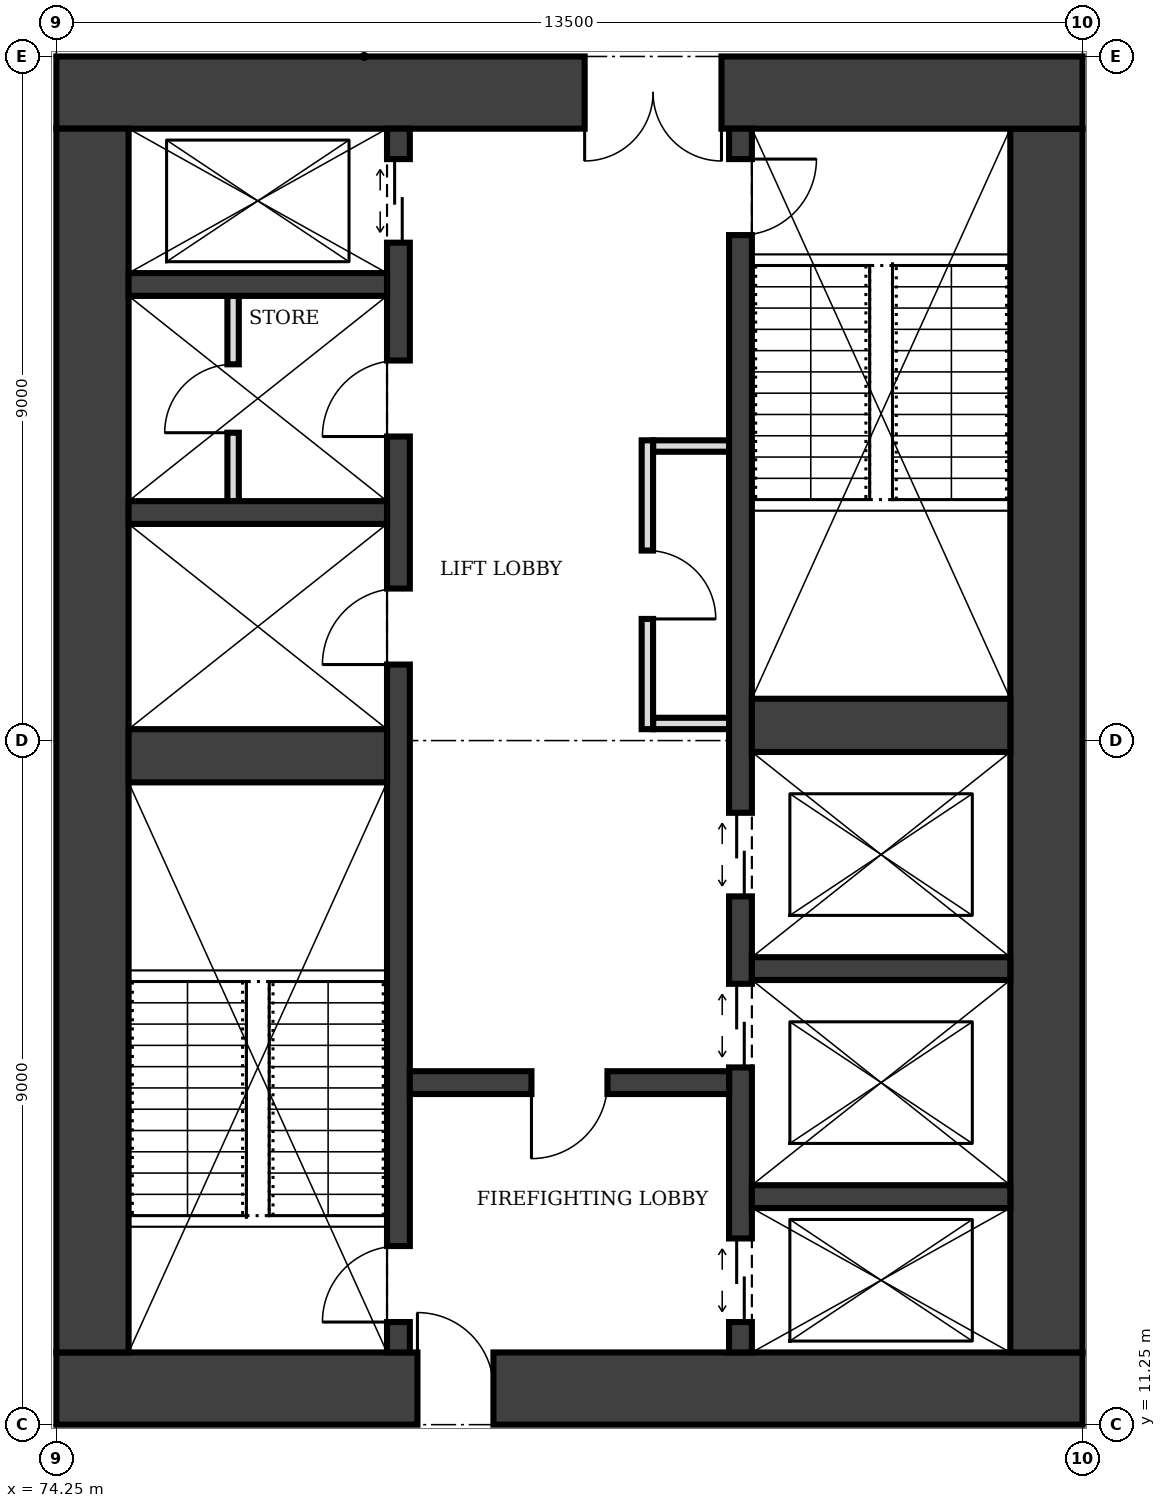
"""IFC4 building model, lengths in metres.
Left out: names, types, materials, properties, quantities, classifications, styles, units other than length and angle.
Written with IfcOpenShell. Run it as: python <this file> out.ifc"""

import sys

from ifc_helpers import new_model, si_unit, direction, frame, frame_2d, origin, place, context, subcontext, project, spatial, rectangle, extrude, element, fill, save


model = new_model("IFC4")
c1 = context("Model", 3, precision=1e-05, world=origin(), true_north=direction((0.0, 1.0)))
c2 = subcontext(c1, "Body", "Model", "MODEL_VIEW")
j1 = project(units=[si_unit("LENGTHUNIT", "METRE"), si_unit("PLANEANGLEUNIT", "RADIAN")], contexts=[c1])
p1 = place(None, origin())
s1 = spatial("IfcSite", under=j1, at=p1, CompositionType="ELEMENT")
p2 = place(p1, origin())
s2 = spatial("IfcBuilding", under=s1, at=p2, CompositionType="ELEMENT")
p3 = place(p2, frame((0.0, 0.0, 209.0)))
s3 = spatial("IfcBuildingStorey", under=s2, at=p3, CompositionType="ELEMENT", Elevation=209.0)
p4 = place(p3, frame((74.25, 11.725, 0.0), z_axis=(0.0, 0.0, 1.0), x_axis=(1.0, 0.0, 0.0)))
e1 = element("IfcWall", 1, at=p4, inside=s3, PredefinedType="SHEAR", context=c2, shape_type="SweptSolid", body=[
    extrude(rectangle(XDim=13.5, YDim=0.95, at=frame_2d((6.75, 0.0))), origin(), (0.0, 0.0, 1.0), 4.0),
])
p5 = place(p4, frame((4.75, 0.0, 0.0)))
e2 = element("IfcOpeningElement", 2, at=p5, cuts=e1, PredefinedType="OPENING", context=c2, shape_type="SweptSolid", body=[
    extrude(rectangle(XDim=1.0, YDim=2.1, at=frame_2d((0.5, 1.05))), frame((0.0, 0.485, 0.0), z_axis=(0.0, -1.0, 0.0), x_axis=(1.0, 0.0, 0.0)), (0.0, 0.0, 1.0), 0.97),
])
p6 = place(p3, frame((87.275, 12.2, 0.0), z_axis=(0.0, 0.0, 1.0), x_axis=(0.0, 1.0, 0.0)))
e3 = element("IfcWall", 3, at=p6, inside=s3, PredefinedType="SHEAR", context=c2, shape_type="SweptSolid", body=[
    extrude(rectangle(XDim=16.1, YDim=0.95, at=frame_2d((8.05, 0.0))), origin(), (0.0, 0.0, 1.0), 4.0),
])
p7 = place(p3, frame((87.75, 28.775, 0.0), z_axis=(0.0, 0.0, 1.0), x_axis=(-1.0, 0.0, 0.0)))
e4 = element("IfcWall", 4, at=p7, inside=s3, PredefinedType="SHEAR", context=c2, shape_type="SweptSolid", body=[
    extrude(rectangle(XDim=13.5, YDim=0.95, at=frame_2d((6.75, 0.0))), origin(), (0.0, 0.0, 1.0), 4.0),
])
p8 = place(p7, frame((4.75, 0.0, 0.0)))
e5 = element("IfcOpeningElement", 5, at=p8, cuts=e4, PredefinedType="OPENING", context=c2, shape_type="SweptSolid", body=[
    extrude(rectangle(XDim=1.8, YDim=2.1, at=frame_2d((0.9, 1.05))), frame((0.0, 0.485, 0.0), z_axis=(0.0, -1.0, 0.0), x_axis=(1.0, 0.0, 0.0)), (0.0, 0.0, 1.0), 0.97),
])
p9 = place(p3, frame((74.725, 28.3, 0.0), z_axis=(0.0, 0.0, 1.0), x_axis=(0.0, -1.0, 0.0)))
e6 = element("IfcWall", 6, at=p9, inside=s3, PredefinedType="SHEAR", context=c2, shape_type="SweptSolid", body=[
    extrude(rectangle(XDim=16.1, YDim=0.95, at=frame_2d((8.05, 0.0))), origin(), (0.0, 0.0, 1.0), 4.0),
])
p10 = place(p3, frame((78.75, 12.2, 0.0), z_axis=(0.0, 0.0, 1.0), x_axis=(0.0, 1.0, 0.0)))
e7 = element("IfcWall", 7, at=p10, inside=s3, PredefinedType="SHEAR", context=c2, shape_type="SweptSolid", body=[
    extrude(rectangle(XDim=16.1, YDim=0.3, at=frame_2d((8.05, 0.0))), origin(), (0.0, 0.0, 1.0), 4.0),
])
p11 = place(p10, frame((0.4, 0.0, 0.0)))
e8 = element("IfcOpeningElement", 8, at=p11, cuts=e7, PredefinedType="OPENING", context=c2, shape_type="SweptSolid", body=[
    extrude(rectangle(XDim=1.0, YDim=2.1, at=frame_2d((0.5, 1.05))), frame((0.0, 0.16, 0.0), z_axis=(0.0, -1.0, 0.0), x_axis=(1.0, 0.0, 0.0)), (0.0, 0.0, 1.0), 0.32),
])
p12 = place(p10, frame((14.6, 0.0, 0.0)))
e9 = element("IfcOpeningElement", 9, at=p12, cuts=e7, PredefinedType="OPENING", context=c2, shape_type="SweptSolid", body=[
    extrude(rectangle(XDim=1.1, YDim=2.1, at=frame_2d((0.55, 1.05))), frame((0.0, 0.16, 0.0), z_axis=(0.0, -1.0, 0.0), x_axis=(1.0, 0.0, 0.0)), (0.0, 0.0, 1.0), 0.32),
])
p13 = place(p10, frame((9.05, 0.0, 0.0)))
e10 = element("IfcOpeningElement", 10, at=p13, cuts=e7, PredefinedType="OPENING", context=c2, shape_type="SweptSolid", body=[
    extrude(rectangle(XDim=1.0, YDim=2.1, at=frame_2d((0.5, 1.05))), frame((0.0, 0.16, 0.0), z_axis=(0.0, -1.0, 0.0), x_axis=(1.0, 0.0, 0.0)), (0.0, 0.0, 1.0), 0.32),
])
p14 = place(p10, frame((12.05, 0.0, 0.0)))
e11 = element("IfcOpeningElement", 11, at=p14, cuts=e7, PredefinedType="OPENING", context=c2, shape_type="SweptSolid", body=[
    extrude(rectangle(XDim=1.0, YDim=2.1, at=frame_2d((0.5, 1.05))), frame((0.0, 0.16, 0.0), z_axis=(0.0, -1.0, 0.0), x_axis=(1.0, 0.0, 0.0)), (0.0, 0.0, 1.0), 0.32),
])
p15 = place(p3, frame((83.25, 12.2, 0.0), z_axis=(0.0, 0.0, 1.0), x_axis=(0.0, 1.0, 0.0)))
e12 = element("IfcWall", 12, at=p15, inside=s3, PredefinedType="SHEAR", context=c2, shape_type="SweptSolid", body=[
    extrude(rectangle(XDim=16.1, YDim=0.3, at=frame_2d((8.05, 0.0))), origin(), (0.0, 0.0, 1.0), 4.0),
])
p16 = place(p15, frame((14.7, 0.0, 0.0)))
e13 = element("IfcOpeningElement", 13, at=p16, cuts=e12, PredefinedType="OPENING", context=c2, shape_type="SweptSolid", body=[
    extrude(rectangle(XDim=1.0, YDim=2.1, at=frame_2d((0.5, 1.05))), frame((0.0, 0.16, 0.0), z_axis=(0.0, -1.0, 0.0), x_axis=(1.0, 0.0, 0.0)), (0.0, 0.0, 1.0), 0.32),
])
p17 = place(p15, frame((0.4, 0.0, 0.0)))
e14 = element("IfcOpeningElement", 14, at=p17, cuts=e12, PredefinedType="OPENING", context=c2, shape_type="SweptSolid", body=[
    extrude(rectangle(XDim=1.1, YDim=2.1, at=frame_2d((0.55, 1.05))), frame((0.0, 0.16, 0.0), z_axis=(0.0, -1.0, 0.0), x_axis=(1.0, 0.0, 0.0)), (0.0, 0.0, 1.0), 0.32),
])
p18 = place(p15, frame((3.75, 0.0, 0.0)))
e15 = element("IfcOpeningElement", 15, at=p18, cuts=e12, PredefinedType="OPENING", context=c2, shape_type="SweptSolid", body=[
    extrude(rectangle(XDim=1.1, YDim=2.1, at=frame_2d((0.55, 1.05))), frame((0.0, 0.16, 0.0), z_axis=(0.0, -1.0, 0.0), x_axis=(1.0, 0.0, 0.0)), (0.0, 0.0, 1.0), 0.32),
])
p19 = place(p15, frame((6.0, 0.0, 0.0)))
e16 = element("IfcOpeningElement", 16, at=p19, cuts=e12, PredefinedType="OPENING", context=c2, shape_type="SweptSolid", body=[
    extrude(rectangle(XDim=1.1, YDim=2.1, at=frame_2d((0.55, 1.05))), frame((0.0, 0.16, 0.0), z_axis=(0.0, -1.0, 0.0), x_axis=(1.0, 0.0, 0.0)), (0.0, 0.0, 1.0), 0.32),
])
p20 = place(p3, frame((75.2, 20.05, 0.0), z_axis=(0.0, 0.0, 1.0), x_axis=(1.0, 0.0, 0.0)))
e17 = element("IfcWall", 17, at=p20, inside=s3, PredefinedType="SHEAR", context=c2, shape_type="SweptSolid", body=[
    extrude(rectangle(XDim=3.4, YDim=0.7, at=frame_2d((1.7, 0.0))), origin(), (0.0, 0.0, 1.0), 4.0),
])
p21 = place(p3, frame((78.9, 15.75, 0.0), z_axis=(0.0, 0.0, 1.0), x_axis=(1.0, 0.0, 0.0)))
e18 = element("IfcWall", 18, at=p21, inside=s3, PredefinedType="SHEAR", context=c2, shape_type="SweptSolid", body=[
    extrude(rectangle(XDim=4.2, YDim=0.3, at=frame_2d((2.1, 0.0))), origin(), (0.0, 0.0, 1.0), 4.0),
])
p22 = place(p21, frame((1.6, 0.0, 0.0)))
e19 = element("IfcOpeningElement", 19, at=p22, cuts=e18, PredefinedType="OPENING", context=c2, shape_type="SweptSolid", body=[
    extrude(rectangle(XDim=1.0, YDim=2.1, at=frame_2d((0.5, 1.05))), frame((0.0, 0.16, 0.0), z_axis=(0.0, -1.0, 0.0), x_axis=(1.0, 0.0, 0.0)), (0.0, 0.0, 1.0), 0.32),
])
for number, where, z_axis, x_axis in (
    (20, (83.4, 14.25, 0.0), (0.0, 0.0, 1.0), (1.0, 0.0, 0.0)),
    (21, (83.4, 17.25, 0.0), (0.0, 0.0, 1.0), (1.0, 0.0, 0.0)),
):
    element("IfcWall", number, at=place(p3, frame(where, z_axis=z_axis, x_axis=x_axis)), inside=s3, PredefinedType="SHEAR", context=c2, shape_type="SweptSolid", body=[
        extrude(rectangle(XDim=3.4, YDim=0.3, at=frame_2d((1.7, 0.0))), origin(), (0.0, 0.0, 1.0), 4.0),
    ])
p23 = place(p3, frame((83.4, 20.45, 0.0), z_axis=(0.0, 0.0, 1.0), x_axis=(1.0, 0.0, 0.0)))
e22 = element("IfcWall", 22, at=p23, inside=s3, PredefinedType="SHEAR", context=c2, shape_type="SweptSolid", body=[
    extrude(rectangle(XDim=3.4, YDim=0.7, at=frame_2d((1.7, 0.0))), origin(), (0.0, 0.0, 1.0), 4.0),
])
for number, where, z_axis, x_axis in (
    (23, (75.2, 23.25, 0.0), (0.0, 0.0, 1.0), (1.0, 0.0, 0.0)),
    (24, (75.2, 26.25, 0.0), (0.0, 0.0, 1.0), (1.0, 0.0, 0.0)),
):
    element("IfcWall", number, at=place(p3, frame(where, z_axis=z_axis, x_axis=x_axis)), inside=s3, PredefinedType="SHEAR", context=c2, shape_type="SweptSolid", body=[
        extrude(rectangle(XDim=3.4, YDim=0.3, at=frame_2d((1.7, 0.0))), origin(), (0.0, 0.0, 1.0), 4.0),
    ])
p24 = place(p3, frame((82.025, 20.4, 0.0), z_axis=(0.0, 0.0, 1.0), x_axis=(0.0, 1.0, 0.0)))
e25 = element("IfcWall", 25, at=p24, inside=s3, PredefinedType="PARTITIONING", context=c2, shape_type="SweptSolid", body=[
    extrude(rectangle(XDim=3.8, YDim=0.15, at=frame_2d((1.9, 0.0))), origin(), (0.0, 0.0, 1.0), 3.75),
])
p25 = place(p24, frame((1.45, 0.0, 0.0)))
e26 = element("IfcOpeningElement", 26, at=p25, cuts=e25, PredefinedType="OPENING", context=c2, shape_type="SweptSolid", body=[
    extrude(rectangle(XDim=0.9, YDim=2.1, at=frame_2d((0.45, 1.05))), frame((0.0, 0.085, 0.0), z_axis=(0.0, -1.0, 0.0), x_axis=(1.0, 0.0, 0.0)), (0.0, 0.0, 1.0), 0.17),
])
for number, where, z_axis, x_axis in (
    (27, (82.1, 20.475, 0.0), (0.0, 0.0, 1.0), (1.0, 0.0, 0.0)),
    (28, (82.1, 24.125, 0.0), (0.0, 0.0, 1.0), (1.0, 0.0, 0.0)),
):
    element("IfcWall", number, at=place(p3, frame(where, z_axis=z_axis, x_axis=x_axis)), inside=s3, PredefinedType="PARTITIONING", context=c2, shape_type="SweptSolid", body=[
        extrude(rectangle(XDim=1.0, YDim=0.15, at=frame_2d((0.5, 0.0))), origin(), (0.0, 0.0, 1.0), 3.75),
    ])
p26 = place(p3, frame((76.575, 23.4, 0.0), z_axis=(0.0, 0.0, 1.0), x_axis=(0.0, 1.0, 0.0)))
e29 = element("IfcWall", 29, at=p26, inside=s3, PredefinedType="PARTITIONING", context=c2, shape_type="SweptSolid", body=[
    extrude(rectangle(XDim=2.7, YDim=0.15, at=frame_2d((1.35, 0.0))), origin(), (0.0, 0.0, 1.0), 3.75),
])
p27 = place(p26, frame((0.9, 0.0, 0.0)))
e30 = element("IfcOpeningElement", 30, at=p27, cuts=e29, PredefinedType="OPENING", context=c2, shape_type="SweptSolid", body=[
    extrude(rectangle(XDim=0.9, YDim=2.1, at=frame_2d((0.45, 1.05))), frame((0.0, 0.085, 0.0), z_axis=(0.0, -1.0, 0.0), x_axis=(1.0, 0.0, 0.0)), (0.0, 0.0, 1.0), 0.17),
])
p28 = place(p5, origin())
e31 = element("IfcDoor", 31, at=p28, inside=s3, OperationType="SINGLE_SWING_LEFT", PredefinedType="DOOR", context=c2, shape_type="SweptSolid", body=[
    extrude(rectangle(XDim=1.0, YDim=2.1, at=frame_2d((0.5, 1.05))), frame((0.0, 0.025, 0.0), z_axis=(0.0, -1.0, 0.0), x_axis=(1.0, 0.0, 0.0)), (0.0, 0.0, 1.0), 0.05),
])
fill(e2, e31)
p29 = place(p8, origin())
e32 = element("IfcDoor", 32, at=p29, inside=s3, OperationType="DOUBLE_DOOR_SINGLE_SWING", PredefinedType="DOOR", context=c2, shape_type="SweptSolid", body=[
    extrude(rectangle(XDim=1.8, YDim=2.1, at=frame_2d((0.9, 1.05))), frame((0.0, 0.025, 0.0), z_axis=(0.0, -1.0, 0.0), x_axis=(1.0, 0.0, 0.0)), (0.0, 0.0, 1.0), 0.05),
])
fill(e5, e32)
p30 = place(p22, frame((1.0, 0.0, 0.0), z_axis=(0.0, 0.0, 1.0), x_axis=(-1.0, 0.0, 0.0)))
e33 = element("IfcDoor", 33, at=p30, inside=s3, OperationType="SINGLE_SWING_RIGHT", PredefinedType="DOOR", context=c2, shape_type="SweptSolid", body=[
    extrude(rectangle(XDim=1.0, YDim=2.1, at=frame_2d((0.5, 1.05))), frame((0.0, 0.025, 0.0), z_axis=(0.0, -1.0, 0.0), x_axis=(1.0, 0.0, 0.0)), (0.0, 0.0, 1.0), 0.05),
])
fill(e19, e33)
p31 = place(p11, origin())
e34 = element("IfcDoor", 34, at=p31, inside=s3, OperationType="SINGLE_SWING_LEFT", PredefinedType="DOOR", context=c2, shape_type="SweptSolid", body=[
    extrude(rectangle(XDim=1.0, YDim=2.1, at=frame_2d((0.5, 1.05))), frame((0.0, 0.025, 0.0), z_axis=(0.0, -1.0, 0.0), x_axis=(1.0, 0.0, 0.0)), (0.0, 0.0, 1.0), 0.05),
])
fill(e8, e34)
p32 = place(p16, frame((1.0, 0.0, 0.0), z_axis=(0.0, 0.0, 1.0), x_axis=(-1.0, 0.0, 0.0)))
e35 = element("IfcDoor", 35, at=p32, inside=s3, OperationType="SINGLE_SWING_LEFT", PredefinedType="DOOR", context=c2, shape_type="SweptSolid", body=[
    extrude(rectangle(XDim=1.0, YDim=2.1, at=frame_2d((0.5, 1.05))), frame((0.0, 0.025, 0.0), z_axis=(0.0, -1.0, 0.0), x_axis=(1.0, 0.0, 0.0)), (0.0, 0.0, 1.0), 0.05),
])
fill(e13, e35)
p33 = place(p17, origin())
e36 = element("IfcDoor", 36, at=p33, inside=s3, OperationType="DOUBLE_DOOR_SLIDING", PredefinedType="DOOR", context=c2, shape_type="SweptSolid", body=[
    extrude(rectangle(XDim=1.1, YDim=2.1, at=frame_2d((0.55, 1.05))), frame((0.0, 0.025, 0.0), z_axis=(0.0, -1.0, 0.0), x_axis=(1.0, 0.0, 0.0)), (0.0, 0.0, 1.0), 0.05),
])
fill(e14, e36)
p34 = place(p12, origin())
e37 = element("IfcDoor", 37, at=p34, inside=s3, OperationType="DOUBLE_DOOR_SLIDING", PredefinedType="DOOR", context=c2, shape_type="SweptSolid", body=[
    extrude(rectangle(XDim=1.1, YDim=2.1, at=frame_2d((0.55, 1.05))), frame((0.0, 0.025, 0.0), z_axis=(0.0, -1.0, 0.0), x_axis=(1.0, 0.0, 0.0)), (0.0, 0.0, 1.0), 0.05),
])
fill(e9, e37)
p35 = place(p18, origin())
e38 = element("IfcDoor", 38, at=p35, inside=s3, OperationType="DOUBLE_DOOR_SLIDING", PredefinedType="DOOR", context=c2, shape_type="SweptSolid", body=[
    extrude(rectangle(XDim=1.1, YDim=2.1, at=frame_2d((0.55, 1.05))), frame((0.0, 0.025, 0.0), z_axis=(0.0, -1.0, 0.0), x_axis=(1.0, 0.0, 0.0)), (0.0, 0.0, 1.0), 0.05),
])
fill(e15, e38)
p36 = place(p19, origin())
e39 = element("IfcDoor", 39, at=p36, inside=s3, OperationType="DOUBLE_DOOR_SLIDING", PredefinedType="DOOR", context=c2, shape_type="SweptSolid", body=[
    extrude(rectangle(XDim=1.1, YDim=2.1, at=frame_2d((0.55, 1.05))), frame((0.0, 0.025, 0.0), z_axis=(0.0, -1.0, 0.0), x_axis=(1.0, 0.0, 0.0)), (0.0, 0.0, 1.0), 0.05),
])
fill(e16, e39)
p37 = place(p25, frame((0.9, 0.0, 0.0), z_axis=(0.0, 0.0, 1.0), x_axis=(-1.0, 0.0, 0.0)))
e40 = element("IfcDoor", 40, at=p37, inside=s3, OperationType="SINGLE_SWING_RIGHT", PredefinedType="DOOR", context=c2, shape_type="SweptSolid", body=[
    extrude(rectangle(XDim=0.9, YDim=2.1, at=frame_2d((0.45, 1.05))), frame((0.0, 0.025, 0.0), z_axis=(0.0, -1.0, 0.0), x_axis=(1.0, 0.0, 0.0)), (0.0, 0.0, 1.0), 0.05),
])
fill(e26, e40)
p38 = place(p13, origin())
e41 = element("IfcDoor", 41, at=p38, inside=s3, OperationType="SINGLE_SWING_LEFT", PredefinedType="DOOR", context=c2, shape_type="SweptSolid", body=[
    extrude(rectangle(XDim=1.0, YDim=2.1, at=frame_2d((0.5, 1.05))), frame((0.0, 0.025, 0.0), z_axis=(0.0, -1.0, 0.0), x_axis=(1.0, 0.0, 0.0)), (0.0, 0.0, 1.0), 0.05),
])
fill(e10, e41)
p39 = place(p14, origin())
e42 = element("IfcDoor", 42, at=p39, inside=s3, OperationType="SINGLE_SWING_LEFT", PredefinedType="DOOR", context=c2, shape_type="SweptSolid", body=[
    extrude(rectangle(XDim=1.0, YDim=2.1, at=frame_2d((0.5, 1.05))), frame((0.0, 0.025, 0.0), z_axis=(0.0, -1.0, 0.0), x_axis=(1.0, 0.0, 0.0)), (0.0, 0.0, 1.0), 0.05),
])
fill(e11, e42)
p40 = place(p27, origin())
e43 = element("IfcDoor", 43, at=p40, inside=s3, OperationType="SINGLE_SWING_LEFT", PredefinedType="DOOR", context=c2, shape_type="SweptSolid", body=[
    extrude(rectangle(XDim=0.9, YDim=2.1, at=frame_2d((0.45, 1.05))), frame((0.0, 0.025, 0.0), z_axis=(0.0, -1.0, 0.0), x_axis=(1.0, 0.0, 0.0)), (0.0, 0.0, 1.0), 0.05),
])
fill(e30, e43)
save(model, sys.argv[1])
